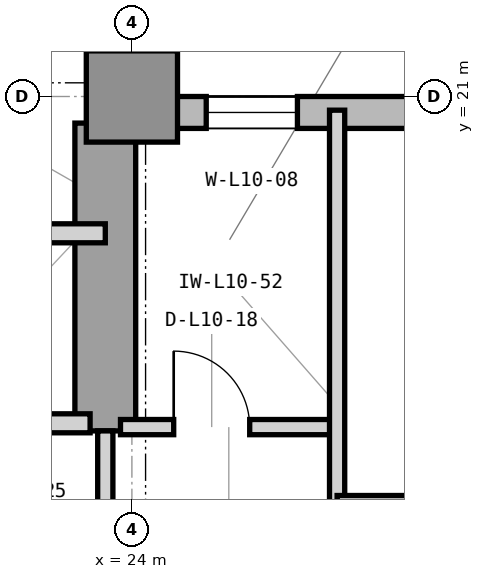
"""IFC4 building model, lengths in metres.
Left out: names, types, materials, properties, quantities, classifications, styles, units other than length and angle.
Written with IfcOpenShell. Run it as: python <this file> out.ifc"""

import sys

from ifc_helpers import new_model, si_unit, direction, frame, frame_2d, origin, origin_2d, place, context, subcontext, project, spatial, rectangle, extrude, element, fill, save


model = new_model("IFC4")
c1 = context("Model", 3, precision=1e-05, world=origin(), true_north=direction((0.0, 1.0)))
c2 = subcontext(c1, "Body", "Model", "MODEL_VIEW")
j1 = project(units=[si_unit("LENGTHUNIT", "METRE"), si_unit("PLANEANGLEUNIT", "RADIAN")], contexts=[c1])
p1 = place(None, origin())
s1 = spatial("IfcSite", under=j1, at=p1, CompositionType="ELEMENT")
p2 = place(p1, origin())
s2 = spatial("IfcBuilding", under=s1, at=p2, CompositionType="ELEMENT")
p3 = place(p2, frame((0.0, 0.0, 46.8)))
s3 = spatial("IfcBuildingStorey", under=s2, at=p3, CompositionType="ELEMENT", Elevation=46.8)
p4 = place(p3, frame((23.65, 16.6, 0.0), z_axis=(0.0, 0.0, 1.0), x_axis=(0.0, 1.0, 0.0)))
e1 = element("IfcWall", 1, at=p4, inside=s3, PredefinedType="SHEAR", context=c2, shape_type="SweptSolid", body=[
    extrude(rectangle(XDim=4.05, YDim=0.8, at=frame_2d((2.025, 0.0))), origin(), (0.0, 0.0, 1.0), 4.2),
])
p5 = place(p3, frame((24.0, 21.0, 0.0), z_axis=(0.0, 0.0, 1.0), x_axis=(1.0, 0.0, 0.0)))
e2 = element("IfcColumn", 2, at=p5, inside=s3, PredefinedType="COLUMN", context=c2, shape_type="SweptSolid", body=[
    extrude(rectangle(XDim=1.2, YDim=1.2, at=origin_2d()), origin(), (0.0, 0.0, 1.0), 4.2),
])
p6 = place(p3, frame((64.4, 20.79, 0.0), z_axis=(0.0, 0.0, 1.0), x_axis=(-1.0, 0.0, 0.0)))
e3 = element("IfcWall", 3, at=p6, inside=s3, PredefinedType="STANDARD", context=c2, shape_type="SweptSolid", body=[
    extrude(rectangle(XDim=40.4, YDim=0.42, at=frame_2d((20.2, 0.0))), origin(), (0.0, 0.0, 1.0), 3.98),
])
p7 = place(p6, frame((26.375, 0.0, 0.85)))
e4 = element("IfcOpeningElement", 4, at=p7, cuts=e3, PredefinedType="OPENING", context=c2, shape_type="SweptSolid", body=[
    extrude(rectangle(XDim=2.8, YDim=2.45, at=frame_2d((1.4, 1.225))), frame((0.0, 0.22, 0.0), z_axis=(0.0, -1.0, 0.0), x_axis=(1.0, 0.0, 0.0)), (0.0, 0.0, 1.0), 0.44),
])
p8 = place(p6, frame((38.222, 0.0, 0.85)))
e5 = element("IfcOpeningElement", 5, at=p8, cuts=e3, PredefinedType="OPENING", context=c2, shape_type="SweptSolid", body=[
    extrude(rectangle(XDim=1.2, YDim=2.45, at=frame_2d((0.6, 1.225))), frame((0.0, 0.22, 0.0), z_axis=(0.0, -1.0, 0.0), x_axis=(1.0, 0.0, 0.0)), (0.0, 0.0, 1.0), 0.44),
])
p9 = place(p6, frame((32.536, 0.0, 0.85)))
e6 = element("IfcOpeningElement", 6, at=p9, cuts=e3, PredefinedType="OPENING", context=c2, shape_type="SweptSolid", body=[
    extrude(rectangle(XDim=2.8, YDim=2.45, at=frame_2d((1.4, 1.225))), frame((0.0, 0.22, 0.0), z_axis=(0.0, -1.0, 0.0), x_axis=(1.0, 0.0, 0.0)), (0.0, 0.0, 1.0), 0.44),
])
p10 = place(p6, frame((17.386, 0.0, 0.85)))
e7 = element("IfcOpeningElement", 7, at=p10, cuts=e3, PredefinedType="OPENING", context=c2, shape_type="SweptSolid", body=[
    extrude(rectangle(XDim=2.8, YDim=2.45, at=frame_2d((1.4, 1.225))), frame((0.0, 0.22, 0.0), z_axis=(0.0, -1.0, 0.0), x_axis=(1.0, 0.0, 0.0)), (0.0, 0.0, 1.0), 0.44),
])
p11 = place(p3, frame((23.79, 21.0, 0.0), z_axis=(0.0, 0.0, 1.0), x_axis=(0.0, 1.0, 0.0)))
e8 = element("IfcWall", 8, at=p11, inside=s3, PredefinedType="STANDARD", context=c2, shape_type="SweptSolid", body=[
    extrude(rectangle(XDim=28.4, YDim=0.42, at=frame_2d((14.2, 0.0))), origin(), (0.0, 0.0, 1.0), 3.98),
])
p12 = place(p11, frame((10.433, 0.0, 0.85)))
e9 = element("IfcOpeningElement", 9, at=p12, cuts=e8, PredefinedType="OPENING", context=c2, shape_type="SweptSolid", body=[
    extrude(rectangle(XDim=2.8, YDim=2.45, at=frame_2d((1.4, 1.225))), frame((0.0, 0.22, 0.0), z_axis=(0.0, -1.0, 0.0), x_axis=(1.0, 0.0, 0.0)), (0.0, 0.0, 1.0), 0.44),
])
p13 = place(p11, frame((16.016, 0.0, 0.85)))
e10 = element("IfcOpeningElement", 10, at=p13, cuts=e8, PredefinedType="OPENING", context=c2, shape_type="SweptSolid", body=[
    extrude(rectangle(XDim=1.2, YDim=2.45, at=frame_2d((0.6, 1.225))), frame((0.0, 0.22, 0.0), z_axis=(0.0, -1.0, 0.0), x_axis=(1.0, 0.0, 0.0)), (0.0, 0.0, 1.0), 0.44),
])
p14 = place(p3, frame((21.05, 16.7, 0.0), z_axis=(0.0, 0.0, 1.0), x_axis=(1.0, 0.0, 0.0)))
e11 = element("IfcWall", 11, at=p14, inside=s3, PredefinedType="PARTITIONING", context=c2, shape_type="SweptSolid", body=[
    extrude(rectangle(XDim=2.4, YDim=0.25, at=frame_2d((1.2, 0.0))), origin(), (0.0, 0.0, 1.0), 3.426),
])
p15 = place(p3, frame((16.45, 19.2, 0.0), z_axis=(0.0, 0.0, 1.0), x_axis=(1.0, 0.0, 0.0)))
e12 = element("IfcWall", 12, at=p15, inside=s3, PredefinedType="PARTITIONING", context=c2, shape_type="SweptSolid", body=[
    extrude(rectangle(XDim=7.2, YDim=0.25, at=frame_2d((3.6, 0.0))), origin(), (0.0, 0.0, 1.0), 3.97),
])
p16 = place(p3, frame((23.65, 13.6, 0.0), z_axis=(0.0, 0.0, 1.0), x_axis=(0.0, 1.0, 0.0)))
e13 = element("IfcWall", 13, at=p16, inside=s3, PredefinedType="PARTITIONING", context=c2, shape_type="SweptSolid", body=[
    extrude(rectangle(XDim=3.0, YDim=0.2, at=frame_2d((1.5, 0.0))), origin(), (0.0, 0.0, 1.0), 3.97),
])
p17 = place(p3, frame((23.85, 16.65, 0.0), z_axis=(0.0, 0.0, 1.0), x_axis=(1.0, 0.0, 0.0)))
e14 = element("IfcWall", 14, at=p17, inside=s3, PredefinedType="PARTITIONING", context=c2, shape_type="SweptSolid", body=[
    extrude(rectangle(XDim=2.85, YDim=0.2, at=frame_2d((1.425, 0.0))), origin(), (0.0, 0.0, 1.0), 3.97),
])
p18 = place(p17, frame((0.7, 0.0, 0.0)))
e15 = element("IfcOpeningElement", 15, at=p18, cuts=e14, PredefinedType="OPENING", context=c2, shape_type="SweptSolid", body=[
    extrude(rectangle(XDim=1.0, YDim=2.15, at=frame_2d((0.5, 1.075))), frame((0.0, 0.11, 0.0), z_axis=(0.0, -1.0, 0.0), x_axis=(1.0, 0.0, 0.0)), (0.0, 0.0, 1.0), 0.22),
])
p19 = place(p3, frame((26.7, 15.65, 0.0), z_axis=(0.0, 0.0, 1.0), x_axis=(0.0, 1.0, 0.0)))
e16 = element("IfcWall", 16, at=p19, inside=s3, PredefinedType="PARTITIONING", context=c2, shape_type="SweptSolid", body=[
    extrude(rectangle(XDim=5.17, YDim=0.2, at=frame_2d((2.585, 0.0))), origin(), (0.0, 0.0, 1.0), 3.97),
])
p20 = place(p3, frame((26.7, 15.65, 0.0), z_axis=(0.0, 0.0, 1.0), x_axis=(1.0, 0.0, 0.0)))
e17 = element("IfcWall", 17, at=p20, inside=s3, PredefinedType="PARTITIONING", context=c2, shape_type="SweptSolid", body=[
    extrude(rectangle(XDim=7.5, YDim=0.2, at=frame_2d((3.75, 0.0))), origin(), (0.0, 0.0, 1.0), 3.97),
])
p21 = place(p20, frame((3.25, 0.0, 0.0)))
e18 = element("IfcOpeningElement", 18, at=p21, cuts=e17, PredefinedType="OPENING", context=c2, shape_type="SweptSolid", body=[
    extrude(rectangle(XDim=1.0, YDim=2.15, at=frame_2d((0.5, 1.075))), frame((0.0, 0.11, 0.0), z_axis=(0.0, -1.0, 0.0), x_axis=(1.0, 0.0, 0.0)), (0.0, 0.0, 1.0), 0.22),
])
p22 = place(p18, origin())
e19 = element("IfcDoor", 19, at=p22, inside=s3, OperationType="SINGLE_SWING_LEFT", PredefinedType="DOOR", context=c2, shape_type="SweptSolid", body=[
    extrude(rectangle(XDim=1.0, YDim=2.15, at=frame_2d((0.5, 1.075))), frame((0.0, 0.025, 0.0), z_axis=(0.0, -1.0, 0.0), x_axis=(1.0, 0.0, 0.0)), (0.0, 0.0, 1.0), 0.05),
])
fill(e15, e19)
p23 = place(p8, origin())
e20 = element("IfcWindow", 20, at=p23, inside=s3, PartitioningType="SINGLE_PANEL", PredefinedType="WINDOW", context=c2, shape_type="SweptSolid", body=[
    extrude(rectangle(XDim=1.2, YDim=2.45, at=frame_2d((0.6, 1.225))), frame((0.0, 0.11, 0.0), z_axis=(0.0, -1.0, 0.0), x_axis=(1.0, 0.0, 0.0)), (0.0, 0.0, 1.0), 0.06),
])
fill(e5, e20)
save(model, sys.argv[1])
